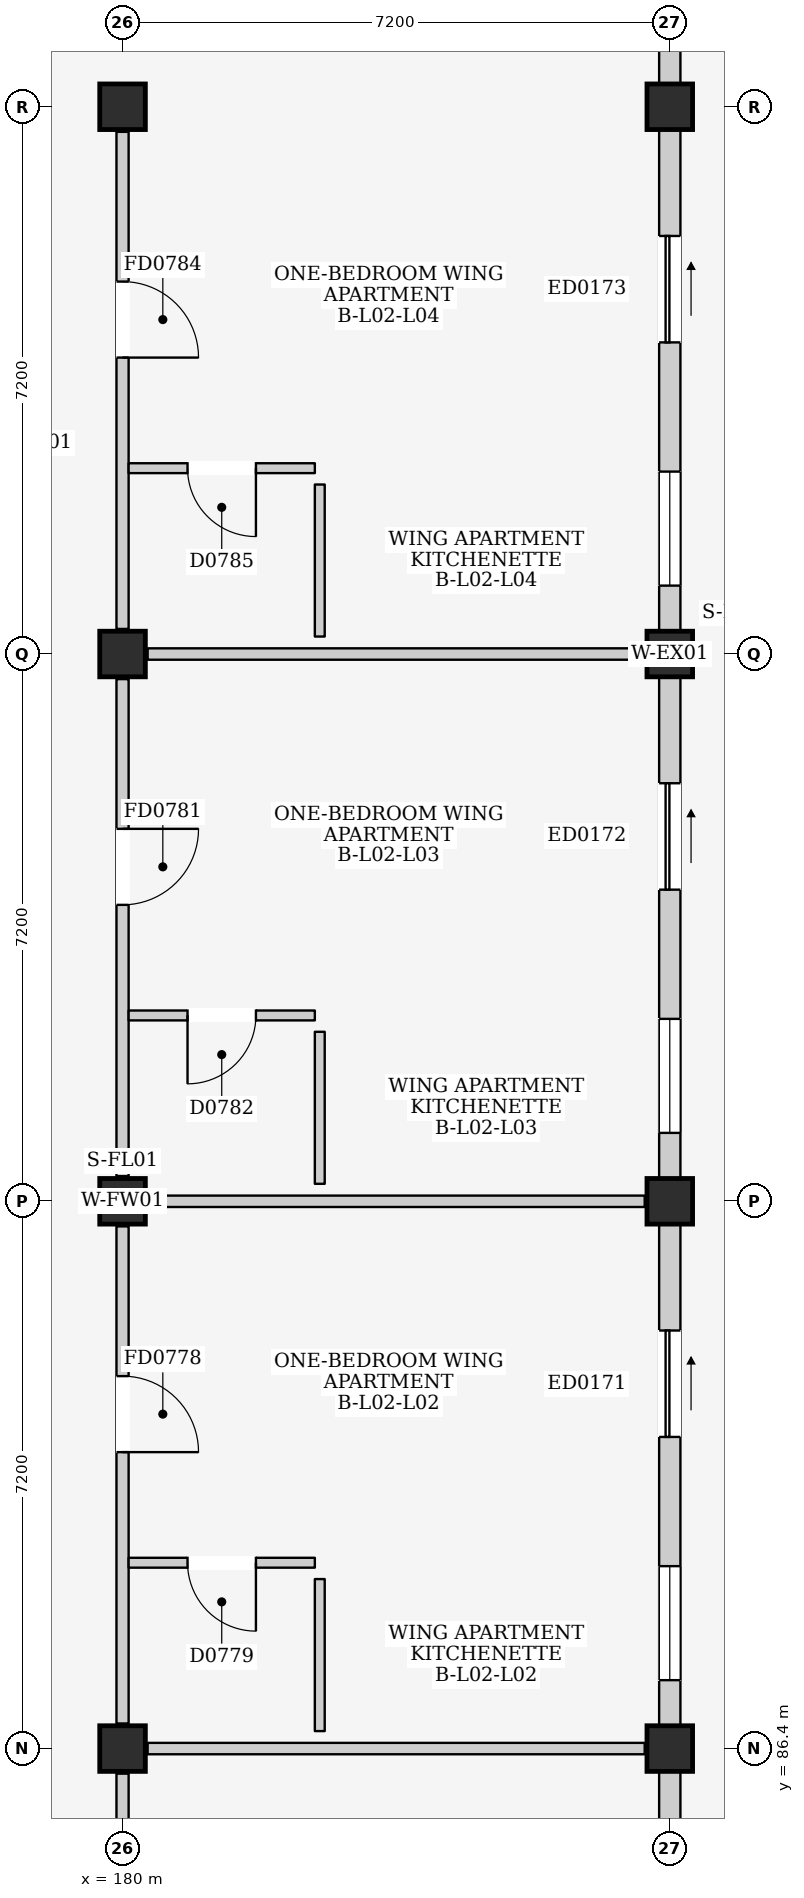
"""IFC4 building model, lengths in metres.
Left out: names, types, materials, properties, quantities, classifications, styles, units other than length and angle.
Written with IfcOpenShell. Run it as: python <this file> out.ifc"""

import sys

from ifc_helpers import new_model, si_unit, direction, frame, frame_2d, origin, origin_2d, place, context, subcontext, project, spatial, rectangle, extrude, element, fill, save


model = new_model("IFC4")
c1 = context("Model", 3, precision=1e-05, world=origin(), true_north=direction((0.0, 1.0)))
c2 = subcontext(c1, "Body", "Model", "MODEL_VIEW")
j1 = project(units=[si_unit("LENGTHUNIT", "METRE"), si_unit("PLANEANGLEUNIT", "RADIAN")], contexts=[c1])
p1 = place(None, origin())
s1 = spatial("IfcSite", under=j1, at=p1, CompositionType="ELEMENT")
p2 = place(p1, origin())
s2 = spatial("IfcBuilding", under=s1, at=p2, CompositionType="ELEMENT")
p3 = place(p2, frame((0.0, 0.0, 9.0)))
s3 = spatial("IfcBuildingStorey", under=s2, at=p3, CompositionType="ELEMENT", Elevation=9.0)
for number, where, z_axis, x_axis in (
    (1, (180.0, 86.4, 0.0), (0.0, 0.0, 1.0), (1.0, 0.0, 0.0)),
    (2, (180.0, 93.6, 0.0), (0.0, 0.0, 1.0), (1.0, 0.0, 0.0)),
    (3, (180.0, 100.8, 0.0), (0.0, 0.0, 1.0), (1.0, 0.0, 0.0)),
    (4, (180.0, 108.0, 0.0), (0.0, 0.0, 1.0), (1.0, 0.0, 0.0)),
    (5, (187.2, 86.4, 0.0), (0.0, 0.0, 1.0), (1.0, 0.0, 0.0)),
    (6, (187.2, 93.6, 0.0), (0.0, 0.0, 1.0), (1.0, 0.0, 0.0)),
    (7, (187.2, 100.8, 0.0), (0.0, 0.0, 1.0), (1.0, 0.0, 0.0)),
    (8, (187.2, 108.0, 0.0), (0.0, 0.0, 1.0), (1.0, 0.0, 0.0)),
):
    element("IfcColumn", number, at=place(p3, frame(where, z_axis=z_axis, x_axis=x_axis)), inside=s3, PredefinedType="COLUMN", context=c2, shape_type="SweptSolid", body=[
        extrude(rectangle(XDim=0.6, YDim=0.6, at=origin_2d()), origin(), (0.0, 0.0, 1.0), 3.2),
    ])
p4 = place(p3, frame((187.2, 79.5, 0.0), z_axis=(0.0, 0.0, 1.0), x_axis=(0.0, 1.0, 0.0)))
e9 = element("IfcWall", 9, at=p4, inside=s3, PredefinedType="ELEMENTEDWALL", context=c2, shape_type="SweptSolid", body=[
    extrude(rectangle(XDim=6.6, YDim=0.28, at=frame_2d((3.3, 0.0))), origin(), (0.0, 0.0, 1.0), 2.425),
])
p5 = place(p4, frame((3.8, 0.0, 0.0)))
e10 = element("IfcOpeningElement", 10, at=p5, cuts=e9, PredefinedType="OPENING", context=c2, shape_type="SweptSolid", body=[
    extrude(rectangle(XDim=1.4, YDim=2.1, at=frame_2d((0.7, 1.05))), frame((0.0, 0.155, 0.0), z_axis=(0.0, -1.0, 0.0), x_axis=(1.0, 0.0, 0.0)), (0.0, 0.0, 1.0), 0.31),
])
p6 = place(p4, frame((0.6, 0.0, 0.815)))
e11 = element("IfcOpeningElement", 11, at=p6, cuts=e9, PredefinedType="OPENING", context=c2, shape_type="SweptSolid", body=[
    extrude(rectangle(XDim=1.5, YDim=1.5, at=frame_2d((0.75, 0.75))), frame((0.0, 0.155, 0.0), z_axis=(0.0, -1.0, 0.0), x_axis=(1.0, 0.0, 0.0)), (0.0, 0.0, 1.0), 0.31),
])
p7 = place(p3, frame((187.2, 86.7, 0.0), z_axis=(0.0, 0.0, 1.0), x_axis=(0.0, 1.0, 0.0)))
e12 = element("IfcWall", 12, at=p7, inside=s3, PredefinedType="ELEMENTEDWALL", context=c2, shape_type="SweptSolid", body=[
    extrude(rectangle(XDim=6.6, YDim=0.28, at=frame_2d((3.3, 0.0))), origin(), (0.0, 0.0, 1.0), 2.425),
])
p8 = place(p7, frame((3.8, 0.0, 0.0)))
e13 = element("IfcOpeningElement", 13, at=p8, cuts=e12, PredefinedType="OPENING", context=c2, shape_type="SweptSolid", body=[
    extrude(rectangle(XDim=1.4, YDim=2.1, at=frame_2d((0.7, 1.05))), frame((0.0, 0.155, 0.0), z_axis=(0.0, -1.0, 0.0), x_axis=(1.0, 0.0, 0.0)), (0.0, 0.0, 1.0), 0.31),
])
p9 = place(p7, frame((0.6, 0.0, 0.815)))
e14 = element("IfcOpeningElement", 14, at=p9, cuts=e12, PredefinedType="OPENING", context=c2, shape_type="SweptSolid", body=[
    extrude(rectangle(XDim=1.5, YDim=1.5, at=frame_2d((0.75, 0.75))), frame((0.0, 0.155, 0.0), z_axis=(0.0, -1.0, 0.0), x_axis=(1.0, 0.0, 0.0)), (0.0, 0.0, 1.0), 0.31),
])
p10 = place(p3, frame((187.2, 93.9, 0.0), z_axis=(0.0, 0.0, 1.0), x_axis=(0.0, 1.0, 0.0)))
e15 = element("IfcWall", 15, at=p10, inside=s3, PredefinedType="ELEMENTEDWALL", context=c2, shape_type="SweptSolid", body=[
    extrude(rectangle(XDim=6.6, YDim=0.28, at=frame_2d((3.3, 0.0))), origin(), (0.0, 0.0, 1.0), 2.425),
])
p11 = place(p10, frame((3.8, 0.0, 0.0)))
e16 = element("IfcOpeningElement", 16, at=p11, cuts=e15, PredefinedType="OPENING", context=c2, shape_type="SweptSolid", body=[
    extrude(rectangle(XDim=1.4, YDim=2.1, at=frame_2d((0.7, 1.05))), frame((0.0, 0.155, 0.0), z_axis=(0.0, -1.0, 0.0), x_axis=(1.0, 0.0, 0.0)), (0.0, 0.0, 1.0), 0.31),
])
p12 = place(p10, frame((0.6, 0.0, 0.815)))
e17 = element("IfcOpeningElement", 17, at=p12, cuts=e15, PredefinedType="OPENING", context=c2, shape_type="SweptSolid", body=[
    extrude(rectangle(XDim=1.5, YDim=1.5, at=frame_2d((0.75, 0.75))), frame((0.0, 0.155, 0.0), z_axis=(0.0, -1.0, 0.0), x_axis=(1.0, 0.0, 0.0)), (0.0, 0.0, 1.0), 0.31),
])
p13 = place(p3, frame((187.2, 101.1, 0.0), z_axis=(0.0, 0.0, 1.0), x_axis=(0.0, 1.0, 0.0)))
e18 = element("IfcWall", 18, at=p13, inside=s3, PredefinedType="ELEMENTEDWALL", context=c2, shape_type="SweptSolid", body=[
    extrude(rectangle(XDim=6.6, YDim=0.28, at=frame_2d((3.3, 0.0))), origin(), (0.0, 0.0, 1.0), 2.425),
])
p14 = place(p13, frame((3.8, 0.0, 0.0)))
e19 = element("IfcOpeningElement", 19, at=p14, cuts=e18, PredefinedType="OPENING", context=c2, shape_type="SweptSolid", body=[
    extrude(rectangle(XDim=1.4, YDim=2.1, at=frame_2d((0.7, 1.05))), frame((0.0, 0.155, 0.0), z_axis=(0.0, -1.0, 0.0), x_axis=(1.0, 0.0, 0.0)), (0.0, 0.0, 1.0), 0.31),
])
p15 = place(p13, frame((0.6, 0.0, 0.815)))
e20 = element("IfcOpeningElement", 20, at=p15, cuts=e18, PredefinedType="OPENING", context=c2, shape_type="SweptSolid", body=[
    extrude(rectangle(XDim=1.5, YDim=1.5, at=frame_2d((0.75, 0.75))), frame((0.0, 0.155, 0.0), z_axis=(0.0, -1.0, 0.0), x_axis=(1.0, 0.0, 0.0)), (0.0, 0.0, 1.0), 0.31),
])
p16 = place(p3, frame((187.2, 108.3, 0.0), z_axis=(0.0, 0.0, 1.0), x_axis=(0.0, 1.0, 0.0)))
e21 = element("IfcWall", 21, at=p16, inside=s3, PredefinedType="ELEMENTEDWALL", context=c2, shape_type="SweptSolid", body=[
    extrude(rectangle(XDim=6.6, YDim=0.28, at=frame_2d((3.3, 0.0))), origin(), (0.0, 0.0, 1.0), 2.425),
])
p17 = place(p16, frame((3.65, 0.0, 0.0)))
e22 = element("IfcOpeningElement", 22, at=p17, cuts=e21, PredefinedType="OPENING", context=c2, shape_type="SweptSolid", body=[
    extrude(rectangle(XDim=1.4, YDim=2.1, at=frame_2d((0.7, 1.05))), frame((0.0, 0.155, 0.0), z_axis=(0.0, -1.0, 0.0), x_axis=(1.0, 0.0, 0.0)), (0.0, 0.0, 1.0), 0.31),
])
p18 = place(p3, frame((180.0, 79.53, 0.0), z_axis=(0.0, 0.0, 1.0), x_axis=(0.0, 1.0, 0.0)))
e23 = element("IfcWall", 23, at=p18, inside=s3, PredefinedType="PARTITIONING", context=c2, shape_type="SweptSolid", body=[
    extrude(rectangle(XDim=6.54, YDim=0.16, at=frame_2d((3.27, 0.0))), origin(), (0.0, 0.0, 1.0), 2.395),
])
p19 = place(p18, frame((3.57, 0.0, 0.0)))
e24 = element("IfcOpeningElement", 24, at=p19, cuts=e23, PredefinedType="OPENING", context=c2, shape_type="SweptSolid", body=[
    extrude(rectangle(XDim=1.0, YDim=2.15, at=frame_2d((0.5, 1.075))), frame((0.0, 0.095, 0.0), z_axis=(0.0, -1.0, 0.0), x_axis=(1.0, 0.0, 0.0)), (0.0, 0.0, 1.0), 0.19),
])
p20 = place(p3, frame((180.33, 86.4, 0.0), z_axis=(0.0, 0.0, 1.0), x_axis=(1.0, 0.0, 0.0)))
e25 = element("IfcWall", 25, at=p20, inside=s3, PredefinedType="PARTITIONING", context=c2, shape_type="SweptSolid", body=[
    extrude(rectangle(XDim=6.54, YDim=0.15, at=frame_2d((3.27, 0.0))), origin(), (0.0, 0.0, 1.0), 2.345),
])
p21 = place(p3, frame((180.0, 86.73, 0.0), z_axis=(0.0, 0.0, 1.0), x_axis=(0.0, 1.0, 0.0)))
e26 = element("IfcWall", 26, at=p21, inside=s3, PredefinedType="PARTITIONING", context=c2, shape_type="SweptSolid", body=[
    extrude(rectangle(XDim=6.54, YDim=0.16, at=frame_2d((3.27, 0.0))), origin(), (0.0, 0.0, 1.0), 2.395),
])
p22 = place(p21, frame((3.57, 0.0, 0.0)))
e27 = element("IfcOpeningElement", 27, at=p22, cuts=e26, PredefinedType="OPENING", context=c2, shape_type="SweptSolid", body=[
    extrude(rectangle(XDim=1.0, YDim=2.15, at=frame_2d((0.5, 1.075))), frame((0.0, 0.095, 0.0), z_axis=(0.0, -1.0, 0.0), x_axis=(1.0, 0.0, 0.0)), (0.0, 0.0, 1.0), 0.19),
])
p23 = place(p3, frame((180.33, 93.6, 0.0), z_axis=(0.0, 0.0, 1.0), x_axis=(1.0, 0.0, 0.0)))
e28 = element("IfcWall", 28, at=p23, inside=s3, PredefinedType="PARTITIONING", context=c2, shape_type="SweptSolid", body=[
    extrude(rectangle(XDim=6.54, YDim=0.15, at=frame_2d((3.27, 0.0))), origin(), (0.0, 0.0, 1.0), 2.345),
])
p24 = place(p3, frame((180.08, 88.845, 0.0), z_axis=(0.0, 0.0, 1.0), x_axis=(1.0, 0.0, 0.0)))
e29 = element("IfcWall", 29, at=p24, inside=s3, PredefinedType="PARTITIONING", context=c2, shape_type="SweptSolid", body=[
    extrude(rectangle(XDim=2.45, YDim=0.13, at=frame_2d((1.225, 0.0))), origin(), (0.0, 0.0, 1.0), 2.96),
])
p25 = place(p24, frame((0.775, 0.0, 0.0)))
e30 = element("IfcOpeningElement", 30, at=p25, cuts=e29, PredefinedType="OPENING", context=c2, shape_type="SweptSolid", body=[
    extrude(rectangle(XDim=0.9, YDim=2.1, at=frame_2d((0.45, 1.05))), frame((0.0, 0.08, 0.0), z_axis=(0.0, -1.0, 0.0), x_axis=(1.0, 0.0, 0.0)), (0.0, 0.0, 1.0), 0.16),
])
p26 = place(p3, frame((182.595, 86.63, 0.0), z_axis=(0.0, 0.0, 1.0), x_axis=(0.0, 1.0, 0.0)))
e31 = element("IfcWall", 31, at=p26, inside=s3, PredefinedType="PARTITIONING", context=c2, shape_type="SweptSolid", body=[
    extrude(rectangle(XDim=2.0, YDim=0.13, at=frame_2d((1.0, 0.0))), origin(), (0.0, 0.0, 1.0), 2.96),
])
p27 = place(p3, frame((180.0, 93.93, 0.0), z_axis=(0.0, 0.0, 1.0), x_axis=(0.0, 1.0, 0.0)))
e32 = element("IfcWall", 32, at=p27, inside=s3, PredefinedType="PARTITIONING", context=c2, shape_type="SweptSolid", body=[
    extrude(rectangle(XDim=6.54, YDim=0.16, at=frame_2d((3.27, 0.0))), origin(), (0.0, 0.0, 1.0), 2.395),
])
p28 = place(p27, frame((3.57, 0.0, 0.0)))
e33 = element("IfcOpeningElement", 33, at=p28, cuts=e32, PredefinedType="OPENING", context=c2, shape_type="SweptSolid", body=[
    extrude(rectangle(XDim=1.0, YDim=2.15, at=frame_2d((0.5, 1.075))), frame((0.0, 0.095, 0.0), z_axis=(0.0, -1.0, 0.0), x_axis=(1.0, 0.0, 0.0)), (0.0, 0.0, 1.0), 0.19),
])
p29 = place(p3, frame((180.33, 100.8, 0.0), z_axis=(0.0, 0.0, 1.0), x_axis=(1.0, 0.0, 0.0)))
e34 = element("IfcWall", 34, at=p29, inside=s3, PredefinedType="PARTITIONING", context=c2, shape_type="SweptSolid", body=[
    extrude(rectangle(XDim=6.54, YDim=0.15, at=frame_2d((3.27, 0.0))), origin(), (0.0, 0.0, 1.0), 2.345),
])
p30 = place(p3, frame((180.08, 96.045, 0.0), z_axis=(0.0, 0.0, 1.0), x_axis=(1.0, 0.0, 0.0)))
e35 = element("IfcWall", 35, at=p30, inside=s3, PredefinedType="PARTITIONING", context=c2, shape_type="SweptSolid", body=[
    extrude(rectangle(XDim=2.45, YDim=0.13, at=frame_2d((1.225, 0.0))), origin(), (0.0, 0.0, 1.0), 2.96),
])
p31 = place(p30, frame((0.775, 0.0, 0.0)))
e36 = element("IfcOpeningElement", 36, at=p31, cuts=e35, PredefinedType="OPENING", context=c2, shape_type="SweptSolid", body=[
    extrude(rectangle(XDim=0.9, YDim=2.1, at=frame_2d((0.45, 1.05))), frame((0.0, 0.08, 0.0), z_axis=(0.0, -1.0, 0.0), x_axis=(1.0, 0.0, 0.0)), (0.0, 0.0, 1.0), 0.16),
])
p32 = place(p3, frame((182.595, 93.83, 0.0), z_axis=(0.0, 0.0, 1.0), x_axis=(0.0, 1.0, 0.0)))
e37 = element("IfcWall", 37, at=p32, inside=s3, PredefinedType="PARTITIONING", context=c2, shape_type="SweptSolid", body=[
    extrude(rectangle(XDim=2.0, YDim=0.13, at=frame_2d((1.0, 0.0))), origin(), (0.0, 0.0, 1.0), 2.96),
])
p33 = place(p3, frame((180.0, 101.13, 0.0), z_axis=(0.0, 0.0, 1.0), x_axis=(0.0, 1.0, 0.0)))
e38 = element("IfcWall", 38, at=p33, inside=s3, PredefinedType="PARTITIONING", context=c2, shape_type="SweptSolid", body=[
    extrude(rectangle(XDim=6.54, YDim=0.16, at=frame_2d((3.27, 0.0))), origin(), (0.0, 0.0, 1.0), 2.395),
])
p34 = place(p33, frame((3.57, 0.0, 0.0)))
e39 = element("IfcOpeningElement", 39, at=p34, cuts=e38, PredefinedType="OPENING", context=c2, shape_type="SweptSolid", body=[
    extrude(rectangle(XDim=1.0, YDim=2.15, at=frame_2d((0.5, 1.075))), frame((0.0, 0.095, 0.0), z_axis=(0.0, -1.0, 0.0), x_axis=(1.0, 0.0, 0.0)), (0.0, 0.0, 1.0), 0.19),
])
p35 = place(p3, frame((180.08, 103.245, 0.0), z_axis=(0.0, 0.0, 1.0), x_axis=(1.0, 0.0, 0.0)))
e40 = element("IfcWall", 40, at=p35, inside=s3, PredefinedType="PARTITIONING", context=c2, shape_type="SweptSolid", body=[
    extrude(rectangle(XDim=2.45, YDim=0.13, at=frame_2d((1.225, 0.0))), origin(), (0.0, 0.0, 1.0), 2.96),
])
p36 = place(p35, frame((0.775, 0.0, 0.0)))
e41 = element("IfcOpeningElement", 41, at=p36, cuts=e40, PredefinedType="OPENING", context=c2, shape_type="SweptSolid", body=[
    extrude(rectangle(XDim=0.9, YDim=2.1, at=frame_2d((0.45, 1.05))), frame((0.0, 0.08, 0.0), z_axis=(0.0, -1.0, 0.0), x_axis=(1.0, 0.0, 0.0)), (0.0, 0.0, 1.0), 0.16),
])
p37 = place(p3, frame((182.595, 101.03, 0.0), z_axis=(0.0, 0.0, 1.0), x_axis=(0.0, 1.0, 0.0)))
e42 = element("IfcWall", 42, at=p37, inside=s3, PredefinedType="PARTITIONING", context=c2, shape_type="SweptSolid", body=[
    extrude(rectangle(XDim=2.0, YDim=0.13, at=frame_2d((1.0, 0.0))), origin(), (0.0, 0.0, 1.0), 2.96),
])
p38 = place(p8, frame((1.4, 0.0, 0.0), z_axis=(0.0, 0.0, 1.0), x_axis=(-1.0, 0.0, 0.0)))
e43 = element("IfcDoor", 43, at=p38, inside=s3, OperationType="SLIDING_TO_RIGHT", PredefinedType="DOOR", context=c2, shape_type="SweptSolid", body=[
    extrude(rectangle(XDim=1.4, YDim=2.1, at=frame_2d((0.7, 1.05))), frame((0.0, 0.025, 0.0), z_axis=(0.0, -1.0, 0.0), x_axis=(1.0, 0.0, 0.0)), (0.0, 0.0, 1.0), 0.05),
])
fill(e13, e43)
p39 = place(p9, origin())
e44 = element("IfcWindow", 44, at=p39, inside=s3, PartitioningType="DOUBLE_PANEL_VERTICAL", PredefinedType="WINDOW", context=c2, shape_type="SweptSolid", body=[
    extrude(rectangle(XDim=1.5, YDim=1.5, at=frame_2d((0.75, 0.75))), frame((0.0, 0.03, 0.0), z_axis=(0.0, -1.0, 0.0), x_axis=(1.0, 0.0, 0.0)), (0.0, 0.0, 1.0), 0.06),
])
fill(e14, e44)
p40 = place(p11, frame((1.4, 0.0, 0.0), z_axis=(0.0, 0.0, 1.0), x_axis=(-1.0, 0.0, 0.0)))
e45 = element("IfcDoor", 45, at=p40, inside=s3, OperationType="SLIDING_TO_RIGHT", PredefinedType="DOOR", context=c2, shape_type="SweptSolid", body=[
    extrude(rectangle(XDim=1.4, YDim=2.1, at=frame_2d((0.7, 1.05))), frame((0.0, 0.025, 0.0), z_axis=(0.0, -1.0, 0.0), x_axis=(1.0, 0.0, 0.0)), (0.0, 0.0, 1.0), 0.05),
])
fill(e16, e45)
p41 = place(p12, origin())
e46 = element("IfcWindow", 46, at=p41, inside=s3, PartitioningType="DOUBLE_PANEL_VERTICAL", PredefinedType="WINDOW", context=c2, shape_type="SweptSolid", body=[
    extrude(rectangle(XDim=1.5, YDim=1.5, at=frame_2d((0.75, 0.75))), frame((0.0, 0.03, 0.0), z_axis=(0.0, -1.0, 0.0), x_axis=(1.0, 0.0, 0.0)), (0.0, 0.0, 1.0), 0.06),
])
fill(e17, e46)
p42 = place(p14, frame((1.4, 0.0, 0.0), z_axis=(0.0, 0.0, 1.0), x_axis=(-1.0, 0.0, 0.0)))
e47 = element("IfcDoor", 47, at=p42, inside=s3, OperationType="SLIDING_TO_RIGHT", PredefinedType="DOOR", context=c2, shape_type="SweptSolid", body=[
    extrude(rectangle(XDim=1.4, YDim=2.1, at=frame_2d((0.7, 1.05))), frame((0.0, 0.025, 0.0), z_axis=(0.0, -1.0, 0.0), x_axis=(1.0, 0.0, 0.0)), (0.0, 0.0, 1.0), 0.05),
])
fill(e19, e47)
p43 = place(p15, origin())
e48 = element("IfcWindow", 48, at=p43, inside=s3, PartitioningType="DOUBLE_PANEL_VERTICAL", PredefinedType="WINDOW", context=c2, shape_type="SweptSolid", body=[
    extrude(rectangle(XDim=1.5, YDim=1.5, at=frame_2d((0.75, 0.75))), frame((0.0, 0.03, 0.0), z_axis=(0.0, -1.0, 0.0), x_axis=(1.0, 0.0, 0.0)), (0.0, 0.0, 1.0), 0.06),
])
fill(e20, e48)
p44 = place(p22, frame((1.0, 0.0, 0.0), z_axis=(0.0, 0.0, 1.0), x_axis=(-1.0, 0.0, 0.0)))
e49 = element("IfcDoor", 49, at=p44, inside=s3, OperationType="SINGLE_SWING_RIGHT", PredefinedType="DOOR", context=c2, shape_type="SweptSolid", body=[
    extrude(rectangle(XDim=1.0, YDim=2.15, at=frame_2d((0.5, 1.075))), frame((0.0, 0.025, 0.0), z_axis=(0.0, -1.0, 0.0), x_axis=(1.0, 0.0, 0.0)), (0.0, 0.0, 1.0), 0.05),
])
fill(e27, e49)
p45 = place(p25, frame((0.9, 0.0, 0.0), z_axis=(0.0, 0.0, 1.0), x_axis=(-1.0, 0.0, 0.0)))
e50 = element("IfcDoor", 50, at=p45, inside=s3, OperationType="SINGLE_SWING_LEFT", PredefinedType="DOOR", context=c2, shape_type="SweptSolid", body=[
    extrude(rectangle(XDim=0.9, YDim=2.1, at=frame_2d((0.45, 1.05))), frame((0.0, 0.025, 0.0), z_axis=(0.0, -1.0, 0.0), x_axis=(1.0, 0.0, 0.0)), (0.0, 0.0, 1.0), 0.05),
])
fill(e30, e50)
p46 = place(p28, frame((1.0, 0.0, 0.0), z_axis=(0.0, 0.0, 1.0), x_axis=(-1.0, 0.0, 0.0)))
e51 = element("IfcDoor", 51, at=p46, inside=s3, OperationType="SINGLE_SWING_LEFT", PredefinedType="DOOR", context=c2, shape_type="SweptSolid", body=[
    extrude(rectangle(XDim=1.0, YDim=2.15, at=frame_2d((0.5, 1.075))), frame((0.0, 0.025, 0.0), z_axis=(0.0, -1.0, 0.0), x_axis=(1.0, 0.0, 0.0)), (0.0, 0.0, 1.0), 0.05),
])
fill(e33, e51)
p47 = place(p31, frame((0.9, 0.0, 0.0), z_axis=(0.0, 0.0, 1.0), x_axis=(-1.0, 0.0, 0.0)))
e52 = element("IfcDoor", 52, at=p47, inside=s3, OperationType="SINGLE_SWING_RIGHT", PredefinedType="DOOR", context=c2, shape_type="SweptSolid", body=[
    extrude(rectangle(XDim=0.9, YDim=2.1, at=frame_2d((0.45, 1.05))), frame((0.0, 0.025, 0.0), z_axis=(0.0, -1.0, 0.0), x_axis=(1.0, 0.0, 0.0)), (0.0, 0.0, 1.0), 0.05),
])
fill(e36, e52)
p48 = place(p34, frame((1.0, 0.0, 0.0), z_axis=(0.0, 0.0, 1.0), x_axis=(-1.0, 0.0, 0.0)))
e53 = element("IfcDoor", 53, at=p48, inside=s3, OperationType="SINGLE_SWING_RIGHT", PredefinedType="DOOR", context=c2, shape_type="SweptSolid", body=[
    extrude(rectangle(XDim=1.0, YDim=2.15, at=frame_2d((0.5, 1.075))), frame((0.0, 0.025, 0.0), z_axis=(0.0, -1.0, 0.0), x_axis=(1.0, 0.0, 0.0)), (0.0, 0.0, 1.0), 0.05),
])
fill(e39, e53)
p49 = place(p36, frame((0.9, 0.0, 0.0), z_axis=(0.0, 0.0, 1.0), x_axis=(-1.0, 0.0, 0.0)))
e54 = element("IfcDoor", 54, at=p49, inside=s3, OperationType="SINGLE_SWING_LEFT", PredefinedType="DOOR", context=c2, shape_type="SweptSolid", body=[
    extrude(rectangle(XDim=0.9, YDim=2.1, at=frame_2d((0.45, 1.05))), frame((0.0, 0.025, 0.0), z_axis=(0.0, -1.0, 0.0), x_axis=(1.0, 0.0, 0.0)), (0.0, 0.0, 1.0), 0.05),
])
fill(e41, e54)
save(model, sys.argv[1])
